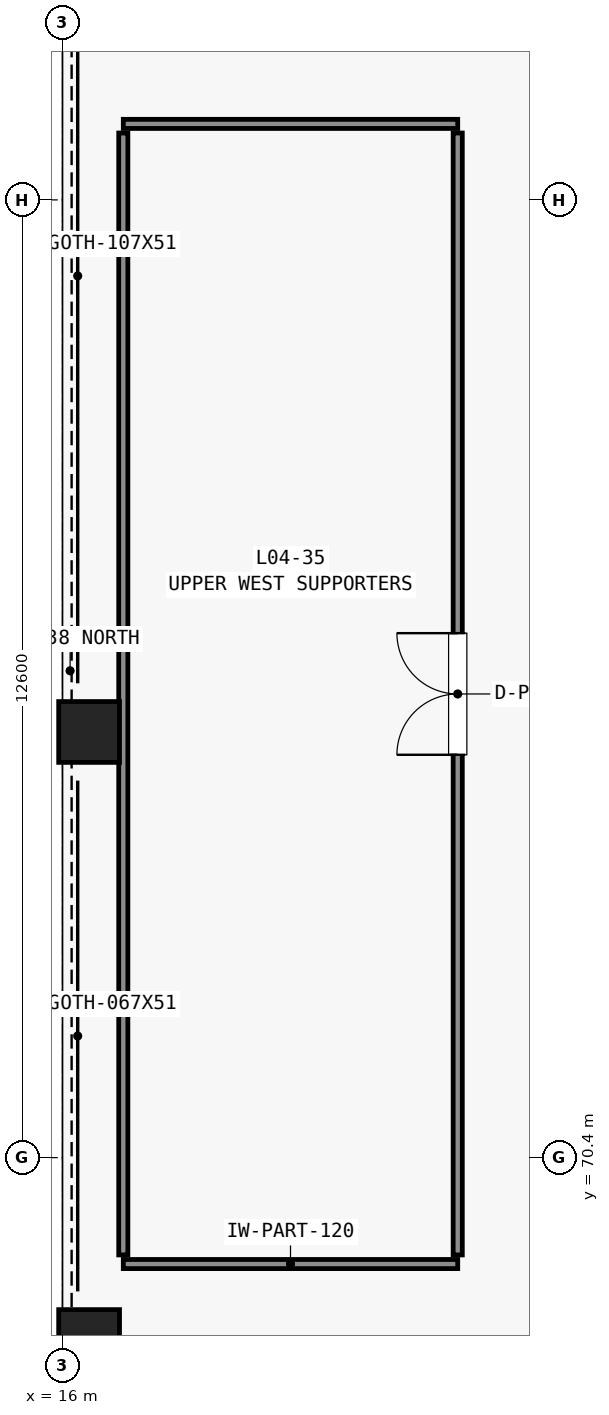
"""IFC4 building model, lengths in metres.
Left out: names, types, materials, properties, quantities, classifications, styles, units other than length and angle.
Written with IfcOpenShell. Run it as: python <this file> out.ifc"""

import sys

from ifc_helpers import new_model, si_unit, direction, frame, frame_2d, origin, origin_2d, place, context, subcontext, project, spatial, rectangle, extrude, element, fill, save


model = new_model("IFC4")
c1 = context("Model", 3, precision=1e-05, world=origin(), true_north=direction((0.0, 1.0)))
c2 = subcontext(c1, "Body", "Model", "MODEL_VIEW")
j1 = project(units=[si_unit("LENGTHUNIT", "METRE"), si_unit("PLANEANGLEUNIT", "RADIAN")], contexts=[c1])
p1 = place(None, origin())
s1 = spatial("IfcSite", under=j1, at=p1, CompositionType="ELEMENT")
p2 = place(p1, origin())
s2 = spatial("IfcBuilding", under=s1, at=p2, CompositionType="ELEMENT")
p3 = place(p2, frame((0.0, 0.0, 21.0)))
s3 = spatial("IfcBuildingStorey", under=s2, at=p3, CompositionType="ELEMENT", Elevation=21.0)
for number, where, z_axis, x_axis in (
    (1, (16.35, 68.0, 0.0), (0.0, 0.0, 1.0), (1.0, 0.0, 0.0)),
    (2, (16.35, 76.0, 0.0), (0.0, 0.0, 1.0), (1.0, 0.0, 0.0)),
):
    element("IfcColumn", number, at=place(p3, frame(where, z_axis=z_axis, x_axis=x_axis)), inside=s3, PredefinedType="PILASTER", context=c2, shape_type="SweptSolid", body=[
        extrude(rectangle(XDim=0.8, YDim=0.8, at=origin_2d()), origin(), (0.0, 0.0, 1.0), 5.4),
    ])
for number, where, z_axis, x_axis in (
    (3, (16.8, 69.0, 0.0), (0.0, 0.0, 1.0), (1.0, 0.0, 0.0)),
    (4, (16.8, 84.0, 0.0), (0.0, 0.0, 1.0), (1.0, 0.0, 0.0)),
):
    element("IfcWall", number, at=place(p3, frame(where, z_axis=z_axis, x_axis=x_axis)), inside=s3, PredefinedType="PARTITIONING", context=c2, shape_type="SweptSolid", body=[
        extrude(rectangle(XDim=4.4, YDim=0.12, at=frame_2d((2.2, 0.0))), origin(), (0.0, 0.0, 1.0), 5.06),
    ])
p4 = place(p3, frame((16.8, 69.12, 0.0), z_axis=(0.0, 0.0, 1.0), x_axis=(0.0, 1.0, 0.0)))
e5 = element("IfcWall", 5, at=p4, inside=s3, PredefinedType="PARTITIONING", context=c2, shape_type="SweptSolid", body=[
    extrude(rectangle(XDim=14.76, YDim=0.12, at=frame_2d((7.38, 0.0))), origin(), (0.0, 0.0, 1.0), 5.06),
])
p5 = place(p3, frame((21.2, 69.12, 0.0), z_axis=(0.0, 0.0, 1.0), x_axis=(0.0, 1.0, 0.0)))
e6 = element("IfcWall", 6, at=p5, inside=s3, PredefinedType="PARTITIONING", context=c2, shape_type="SweptSolid", body=[
    extrude(rectangle(XDim=14.76, YDim=0.12, at=frame_2d((7.38, 0.0))), origin(), (0.0, 0.0, 1.0), 5.06),
])
p6 = place(p5, frame((6.58, 0.0, 0.0)))
e7 = element("IfcOpeningElement", 7, at=p6, cuts=e6, PredefinedType="OPENING", context=c2, shape_type="SweptSolid", body=[
    extrude(rectangle(XDim=1.6, YDim=2.25, at=frame_2d((0.8, 1.125))), frame((0.0, 0.07, 0.0), z_axis=(0.0, -1.0, 0.0), x_axis=(1.0, 0.0, 0.0)), (0.0, 0.0, 1.0), 0.14),
])
p7 = place(p6, origin())
e8 = element("IfcDoor", 8, at=p7, inside=s3, OperationType="DOUBLE_DOOR_SINGLE_SWING", PredefinedType="DOOR", context=c2, shape_type="SweptSolid", body=[
    extrude(rectangle(XDim=1.6, YDim=2.25, at=frame_2d((0.8, 1.125))), frame((0.0, 0.025, 0.0), z_axis=(0.0, -1.0, 0.0), x_axis=(1.0, 0.0, 0.0)), (0.0, 0.0, 1.0), 0.05),
])
fill(e7, e8)
save(model, sys.argv[1])
